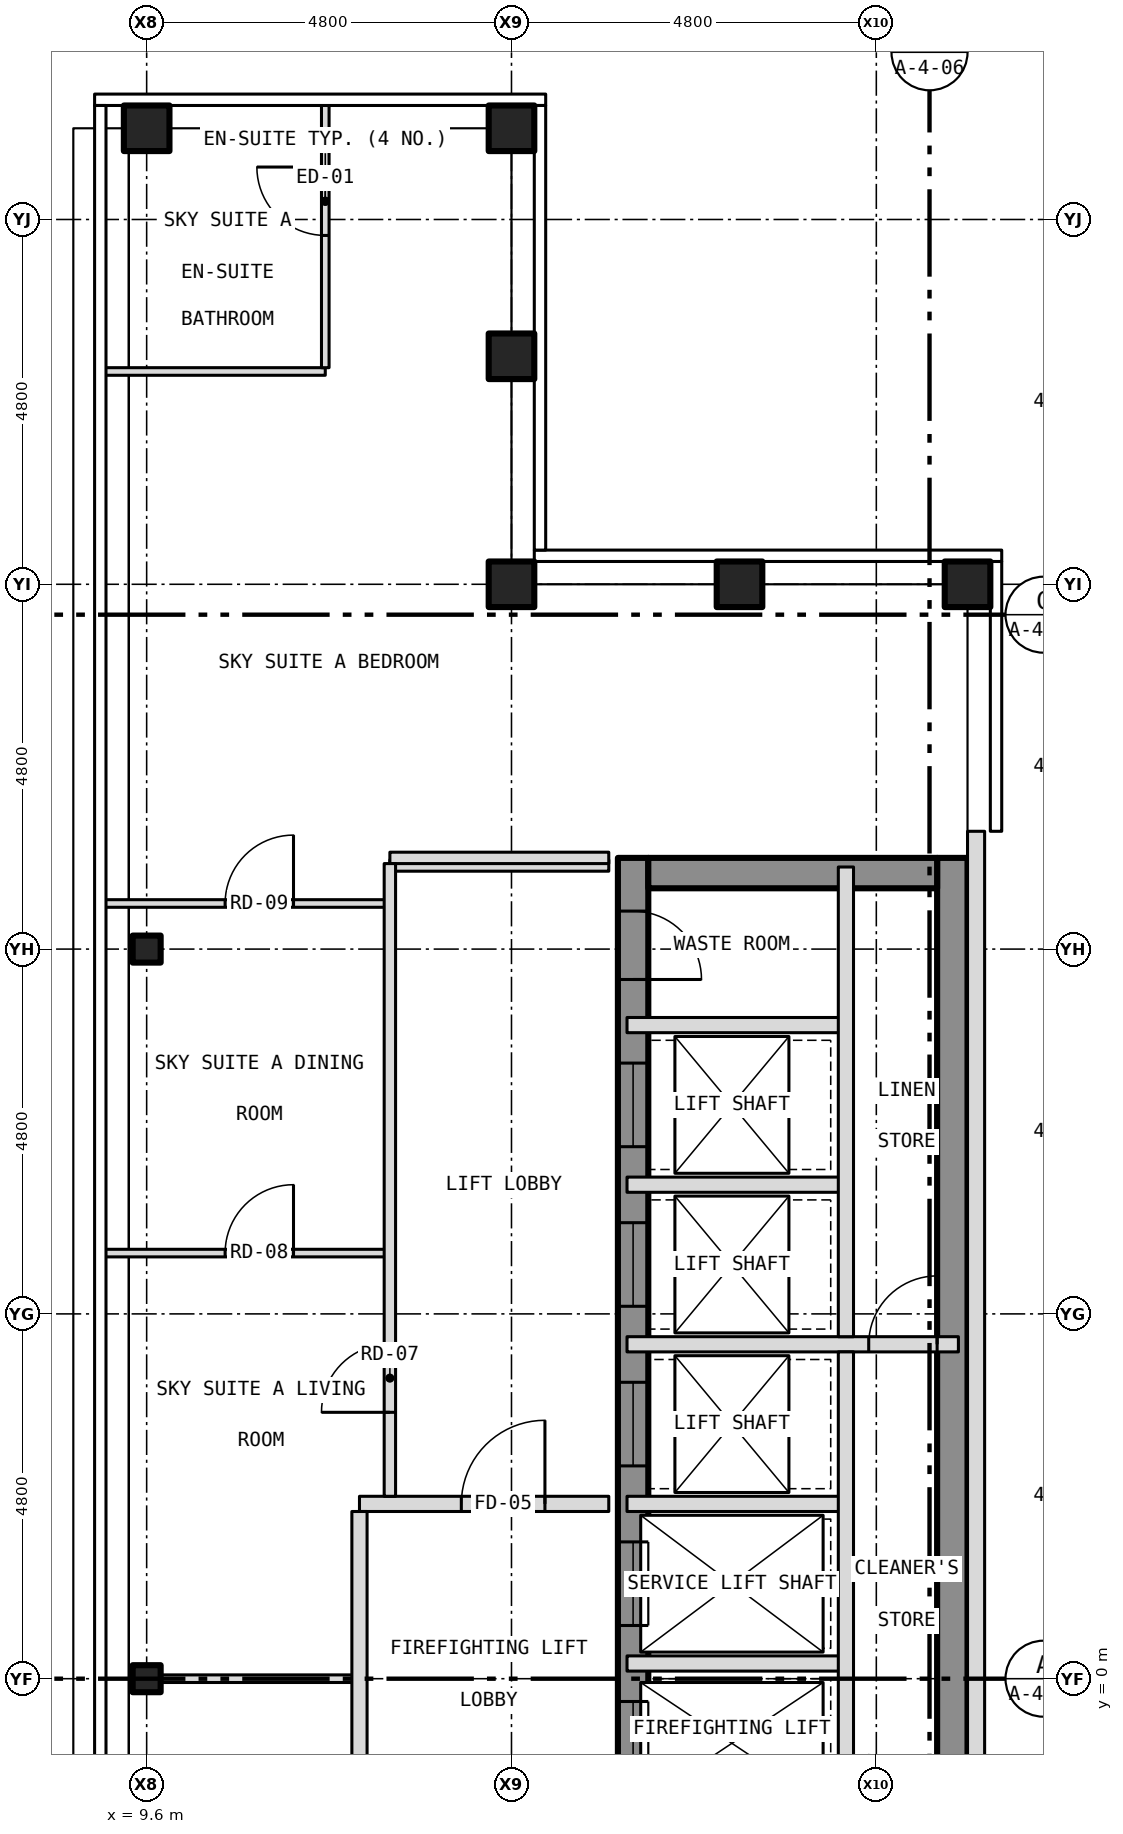
"""IFC4 building model, lengths in metres.
Left out: names, types, materials, properties, quantities, classifications, styles, units other than length and angle.
Written with IfcOpenShell. Run it as: python <this file> out.ifc"""

import sys

from ifc_helpers import new_model, si_unit, direction, frame, frame_2d, origin, origin_2d, place, context, subcontext, project, spatial, rectangle, hollow_rectangle, i_section, extrude, element, fill, save


model = new_model("IFC4")
c1 = context("Model", 3, precision=1e-05, world=origin(), true_north=direction((0.0, 1.0)))
c2 = subcontext(c1, "Body", "Model", "MODEL_VIEW")
j1 = project(units=[si_unit("LENGTHUNIT", "METRE"), si_unit("PLANEANGLEUNIT", "RADIAN")], contexts=[c1])
p1 = place(None, origin())
s1 = spatial("IfcSite", under=j1, at=p1, CompositionType="ELEMENT")
p2 = place(p1, origin())
s2 = spatial("IfcBuilding", under=s1, at=p2, CompositionType="ELEMENT")
p3 = place(p2, frame((0.0, 0.0, 276.0)))
s3 = spatial("IfcBuildingStorey", under=s2, at=p3, CompositionType="ELEMENT", Elevation=276.0)
for number, where, z_axis, x_axis in (
    (1, (9.6, 20.4, -0.15), (0.0, 0.0, 1.0), (1.0, 0.0, 0.0)),
    (2, (14.4, 20.4, -0.15), (0.0, 0.0, 1.0), (1.0, 0.0, 0.0)),
    (3, (20.4, 14.4, -0.15), (0.0, 0.0, 1.0), (1.0, 0.0, 0.0)),
    (4, (14.4, 14.4, -0.15), (0.0, 0.0, 1.0), (1.0, 0.0, 0.0)),
    (5, (14.4, 17.4, -0.15), (0.0, 0.0, 1.0), (1.0, 0.0, 0.0)),
    (6, (17.4, 14.4, -0.15), (0.0, 0.0, 1.0), (1.0, 0.0, 0.0)),
):
    element("IfcColumn", number, at=place(p3, frame(where, z_axis=z_axis, x_axis=x_axis)), inside=s3, PredefinedType="COLUMN", context=c2, shape_type="SweptSolid", body=[
        extrude(hollow_rectangle(XDim=0.6, YDim=0.6, WallThickness=0.03, at=origin_2d()), origin(), (0.0, 0.0, 1.0), 3.5),
    ])
for number, where, z_axis, x_axis in (
    (7, (9.6, 0.0, -0.15), (0.0, 0.0, 1.0), (1.0, 0.0, 0.0)),
    (8, (9.6, 9.6, -0.15), (0.0, 0.0, 1.0), (1.0, 0.0, 0.0)),
):
    element("IfcColumn", number, at=place(p3, frame(where, z_axis=z_axis, x_axis=x_axis)), inside=s3, PredefinedType="COLUMN", context=c2, shape_type="SweptSolid", body=[
        extrude(i_section(OverallWidth=0.368, OverallDepth=0.356, WebThickness=0.011, FlangeThickness=0.018, at=origin_2d()), origin(), (0.0, 0.0, 1.0), 3.5),
    ])
p4 = place(p3, frame((16.0, -10.8, 0.0), z_axis=(0.0, 0.0, 1.0), x_axis=(0.0, 1.0, 0.0)))
e9 = element("IfcWall", 9, at=p4, inside=s3, PredefinedType="SHEAR", context=c2, shape_type="SweptSolid", body=[
    extrude(rectangle(XDim=21.6, YDim=0.4, at=frame_2d((10.8, 0.0))), origin(), (0.0, 0.0, 1.0), 3.25),
])
p5 = place(p4, frame((9.4, 0.0, 0.0)))
e10 = element("IfcOpeningElement", 10, at=p5, cuts=e9, PredefinedType="OPENING", context=c2, shape_type="SweptSolid", body=[
    extrude(rectangle(XDim=1.1, YDim=2.1, at=frame_2d((0.55, 1.05))), frame((0.0, 0.212, 0.0), z_axis=(0.0, -1.0, 0.0), x_axis=(1.0, 0.0, 0.0)), (0.0, 0.0, 1.0), 0.424),
])
p6 = place(p4, frame((11.5, 0.0, 0.0)))
e11 = element("IfcOpeningElement", 11, at=p6, cuts=e9, PredefinedType="OPENING", context=c2, shape_type="SweptSolid", body=[
    extrude(rectangle(XDim=1.1, YDim=2.1, at=frame_2d((0.55, 1.05))), frame((0.0, 0.212, 0.0), z_axis=(0.0, -1.0, 0.0), x_axis=(1.0, 0.0, 0.0)), (0.0, 0.0, 1.0), 0.424),
])
p7 = place(p4, frame((13.6, 0.0, 0.0)))
e12 = element("IfcOpeningElement", 12, at=p7, cuts=e9, PredefinedType="OPENING", context=c2, shape_type="SweptSolid", body=[
    extrude(rectangle(XDim=1.1, YDim=2.1, at=frame_2d((0.55, 1.05))), frame((0.0, 0.212, 0.0), z_axis=(0.0, -1.0, 0.0), x_axis=(1.0, 0.0, 0.0)), (0.0, 0.0, 1.0), 0.424),
])
p8 = place(p4, frame((15.7, 0.0, 0.0)))
e13 = element("IfcOpeningElement", 13, at=p8, cuts=e9, PredefinedType="OPENING", context=c2, shape_type="SweptSolid", body=[
    extrude(rectangle(XDim=1.1, YDim=2.1, at=frame_2d((0.55, 1.05))), frame((0.0, 0.212, 0.0), z_axis=(0.0, -1.0, 0.0), x_axis=(1.0, 0.0, 0.0)), (0.0, 0.0, 1.0), 0.424),
])
p9 = place(p4, frame((17.8, 0.0, 0.0)))
e14 = element("IfcOpeningElement", 14, at=p9, cuts=e9, PredefinedType="OPENING", context=c2, shape_type="SweptSolid", body=[
    extrude(rectangle(XDim=1.1, YDim=2.1, at=frame_2d((0.55, 1.05))), frame((0.0, 0.212, 0.0), z_axis=(0.0, -1.0, 0.0), x_axis=(1.0, 0.0, 0.0)), (0.0, 0.0, 1.0), 0.424),
])
p10 = place(p4, frame((5.642, 0.0, 0.0)))
e15 = element("IfcOpeningElement", 15, at=p10, cuts=e9, PredefinedType="OPENING", context=c2, shape_type="SweptSolid", body=[
    extrude(rectangle(XDim=1.1, YDim=2.1, at=frame_2d((0.55, 1.05))), frame((0.0, 0.212, 0.0), z_axis=(0.0, -1.0, 0.0), x_axis=(1.0, 0.0, 0.0)), (0.0, 0.0, 1.0), 0.424),
])
p11 = place(p4, frame((7.5, 0.0, 0.0)))
e16 = element("IfcOpeningElement", 16, at=p11, cuts=e9, PredefinedType="OPENING", context=c2, shape_type="SweptSolid", body=[
    extrude(rectangle(XDim=1.1, YDim=2.1, at=frame_2d((0.55, 1.05))), frame((0.0, 0.212, 0.0), z_axis=(0.0, -1.0, 0.0), x_axis=(1.0, 0.0, 0.0)), (0.0, 0.0, 1.0), 0.424),
])
p12 = place(p4, frame((20.0, 0.0, 0.0)))
e17 = element("IfcOpeningElement", 17, at=p12, cuts=e9, PredefinedType="OPENING", context=c2, shape_type="SweptSolid", body=[
    extrude(rectangle(XDim=0.9, YDim=2.1, at=frame_2d((0.45, 1.05))), frame((0.0, 0.212, 0.0), z_axis=(0.0, -1.0, 0.0), x_axis=(1.0, 0.0, 0.0)), (0.0, 0.0, 1.0), 0.424),
])
p13 = place(p3, frame((20.2, -10.8, 0.0), z_axis=(0.0, 0.0, 1.0), x_axis=(0.0, 1.0, 0.0)))
e18 = element("IfcWall", 18, at=p13, inside=s3, PredefinedType="SHEAR", context=c2, shape_type="SweptSolid", body=[
    extrude(rectangle(XDim=21.6, YDim=0.4, at=frame_2d((10.8, 0.0))), origin(), (0.0, 0.0, 1.0), 3.25),
])
p14 = place(p3, frame((16.2, 10.6, 0.0), z_axis=(0.0, 0.0, 1.0), x_axis=(1.0, 0.0, 0.0)))
e19 = element("IfcWall", 19, at=p14, inside=s3, PredefinedType="SHEAR", context=c2, shape_type="SweptSolid", body=[
    extrude(rectangle(XDim=3.8, YDim=0.4, at=frame_2d((1.9, 0.0))), origin(), (0.0, 0.0, 1.0), 3.25),
])
p15 = place(p3, frame((20.512, -11.15, 0.0), z_axis=(0.0, 0.0, 1.0), x_axis=(0.0, 1.0, 0.0)))
e20 = element("IfcWall", 20, at=p15, inside=s3, PredefinedType="SOLIDWALL", context=c2, shape_type="SweptSolid", body=[
    extrude(rectangle(XDim=22.3, YDim=0.225, at=frame_2d((11.15, 0.0))), origin(), (0.0, 0.0, 1.0), 3.5),
])
p16 = place(p15, frame((3.3, 0.0, 1.0)))
e21 = element("IfcOpeningElement", 21, at=p16, cuts=e20, PredefinedType="OPENING", context=c2, shape_type="SweptSolid", body=[
    extrude(rectangle(XDim=0.6, YDim=1.5, at=frame_2d((0.3, 0.75))), frame((0.0, 0.125, 0.0), z_axis=(0.0, -1.0, 0.0), x_axis=(1.0, 0.0, 0.0)), (0.0, 0.0, 1.0), 0.249),
])
p17 = place(p3, frame((9.485, 0.0, 0.0), z_axis=(0.0, 0.0, 1.0), x_axis=(1.0, 0.0, 0.0)))
e22 = element("IfcWall", 22, at=p17, inside=s3, PredefinedType="PARTITIONING", context=c2, shape_type="SweptSolid", body=[
    extrude(rectangle(XDim=2.915, YDim=0.1, at=frame_2d((1.458, 0.0))), origin(), (0.0, 0.0, 1.0), 2.728),
])
p18 = place(p3, frame((15.92, 0.2, 0.0), z_axis=(0.0, 0.0, 1.0), x_axis=(1.0, 0.0, 0.0)))
e23 = element("IfcWall", 23, at=p18, inside=s3, PredefinedType="PARTITIONING", context=c2, shape_type="SweptSolid", body=[
    extrude(rectangle(XDim=2.88, YDim=0.2, at=frame_2d((1.44, 0.0))), origin(), (0.0, 0.0, 1.0), 3.25),
])
p19 = place(p3, frame((12.4, 2.3, 0.0), z_axis=(0.0, 0.0, 1.0), x_axis=(1.0, 0.0, 0.0)))
e24 = element("IfcWall", 24, at=p19, inside=s3, PredefinedType="PARTITIONING", context=c2, shape_type="SweptSolid", body=[
    extrude(rectangle(XDim=3.28, YDim=0.2, at=frame_2d((1.64, 0.0))), origin(), (0.0, 0.0, 1.0), 3.35),
])
p20 = place(p19, frame((1.34, 0.0, 0.0)))
e25 = element("IfcOpeningElement", 25, at=p20, cuts=e24, PredefinedType="OPENING", context=c2, shape_type="SweptSolid", body=[
    extrude(rectangle(XDim=1.1, YDim=2.1, at=frame_2d((0.55, 1.05))), frame((0.0, 0.112, 0.0), z_axis=(0.0, -1.0, 0.0), x_axis=(1.0, 0.0, 0.0)), (0.0, 0.0, 1.0), 0.224),
])
p21 = place(p3, frame((15.92, 2.3, 0.0), z_axis=(0.0, 0.0, 1.0), x_axis=(1.0, 0.0, 0.0)))
e26 = element("IfcWall", 26, at=p21, inside=s3, PredefinedType="PARTITIONING", context=c2, shape_type="SweptSolid", body=[
    extrude(rectangle(XDim=2.88, YDim=0.2, at=frame_2d((1.44, 0.0))), origin(), (0.0, 0.0, 1.0), 3.25),
])
p22 = place(p3, frame((15.92, 4.4, 0.0), z_axis=(0.0, 0.0, 1.0), x_axis=(1.0, 0.0, 0.0)))
e27 = element("IfcWall", 27, at=p22, inside=s3, PredefinedType="PARTITIONING", context=c2, shape_type="SweptSolid", body=[
    extrude(rectangle(XDim=4.36, YDim=0.2, at=frame_2d((2.18, 0.0))), origin(), (0.0, 0.0, 1.0), 3.25),
])
p23 = place(p22, frame((3.18, 0.0, 0.0)))
e28 = element("IfcOpeningElement", 28, at=p23, cuts=e27, PredefinedType="OPENING", context=c2, shape_type="SweptSolid", body=[
    extrude(rectangle(XDim=0.9, YDim=2.1, at=frame_2d((0.45, 1.05))), frame((0.0, 0.112, 0.0), z_axis=(0.0, -1.0, 0.0), x_axis=(1.0, 0.0, 0.0)), (0.0, 0.0, 1.0), 0.224),
])
p24 = place(p3, frame((9.035, 5.6, 0.0), z_axis=(0.0, 0.0, 1.0), x_axis=(1.0, 0.0, 0.0)))
e29 = element("IfcWall", 29, at=p24, inside=s3, PredefinedType="PARTITIONING", context=c2, shape_type="SweptSolid", body=[
    extrude(rectangle(XDim=3.765, YDim=0.1, at=frame_2d((1.883, 0.0))), origin(), (0.0, 0.0, 1.0), 3.35),
])
p25 = place(p24, frame((1.597, 0.0, 0.0)))
e30 = element("IfcOpeningElement", 30, at=p25, cuts=e29, PredefinedType="OPENING", context=c2, shape_type="SweptSolid", body=[
    extrude(rectangle(XDim=0.9, YDim=2.1, at=frame_2d((0.45, 1.05))), frame((0.0, 0.062, 0.0), z_axis=(0.0, -1.0, 0.0), x_axis=(1.0, 0.0, 0.0)), (0.0, 0.0, 1.0), 0.124),
])
for number, where, z_axis, x_axis in (
    (31, (15.92, 6.5, 0.0), (0.0, 0.0, 1.0), (1.0, 0.0, 0.0)),
    (32, (15.92, 8.6, 0.0), (0.0, 0.0, 1.0), (1.0, 0.0, 0.0)),
):
    element("IfcWall", number, at=place(p3, frame(where, z_axis=z_axis, x_axis=x_axis)), inside=s3, PredefinedType="PARTITIONING", context=c2, shape_type="SweptSolid", body=[
        extrude(rectangle(XDim=2.88, YDim=0.2, at=frame_2d((1.44, 0.0))), origin(), (0.0, 0.0, 1.0), 3.25),
    ])
p26 = place(p3, frame((9.035, 10.2, 0.0), z_axis=(0.0, 0.0, 1.0), x_axis=(1.0, 0.0, 0.0)))
e33 = element("IfcWall", 33, at=p26, inside=s3, PredefinedType="PARTITIONING", context=c2, shape_type="SweptSolid", body=[
    extrude(rectangle(XDim=3.765, YDim=0.1, at=frame_2d((1.883, 0.0))), origin(), (0.0, 0.0, 1.0), 3.35),
])
p27 = place(p26, frame((1.597, 0.0, 0.0)))
e34 = element("IfcOpeningElement", 34, at=p27, cuts=e33, PredefinedType="OPENING", context=c2, shape_type="SweptSolid", body=[
    extrude(rectangle(XDim=0.9, YDim=2.1, at=frame_2d((0.45, 1.05))), frame((0.0, 0.062, 0.0), z_axis=(0.0, -1.0, 0.0), x_axis=(1.0, 0.0, 0.0)), (0.0, 0.0, 1.0), 0.124),
])
for number, where, z_axis, x_axis in (
    (35, (12.8, 10.7, 0.0), (0.0, 0.0, 1.0), (1.0, 0.0, 0.0)),
    (36, (12.8, 10.8, 0.0), (0.0, 0.0, 1.0), (1.0, 0.0, 0.0)),
):
    element("IfcWall", number, at=place(p3, frame(where, z_axis=z_axis, x_axis=x_axis)), inside=s3, PredefinedType="PARTITIONING", context=c2, shape_type="SweptSolid", body=[
        extrude(rectangle(XDim=2.88, YDim=0.15, at=frame_2d((1.44, 0.0))), origin(), (0.0, 0.0, 1.0), 3.35),
    ])
p28 = place(p3, frame((9.035, 17.2, 0.0), z_axis=(0.0, 0.0, 1.0), x_axis=(1.0, 0.0, 0.0)))
e37 = element("IfcWall", 37, at=p28, inside=s3, PredefinedType="PARTITIONING", context=c2, shape_type="SweptSolid", body=[
    extrude(rectangle(XDim=2.915, YDim=0.1, at=frame_2d((1.458, 0.0))), origin(), (0.0, 0.0, 1.0), 3.35),
])
p29 = place(p3, frame((11.95, 17.25, 0.0), z_axis=(0.0, 0.0, 1.0), x_axis=(0.0, 1.0, 0.0)))
e38 = element("IfcWall", 38, at=p29, inside=s3, PredefinedType="PARTITIONING", context=c2, shape_type="SweptSolid", body=[
    extrude(rectangle(XDim=3.48, YDim=0.1, at=frame_2d((1.74, 0.0))), origin(), (0.0, 0.0, 1.0), 3.35),
])
p30 = place(p29, frame((1.74, 0.0, 0.0)))
e39 = element("IfcOpeningElement", 39, at=p30, cuts=e38, PredefinedType="OPENING", context=c2, shape_type="SweptSolid", body=[
    extrude(rectangle(XDim=0.9, YDim=2.1, at=frame_2d((0.45, 1.05))), frame((0.0, 0.062, 0.0), z_axis=(0.0, -1.0, 0.0), x_axis=(1.0, 0.0, 0.0)), (0.0, 0.0, 1.0), 0.124),
])
p31 = place(p3, frame((12.4, -1.8, 0.0), z_axis=(0.0, 0.0, 1.0), x_axis=(0.0, 1.0, 0.0)))
e40 = element("IfcWall", 40, at=p31, inside=s3, PredefinedType="PARTITIONING", context=c2, shape_type="SweptSolid", body=[
    extrude(rectangle(XDim=4.0, YDim=0.2, at=frame_2d((2.0, 0.0))), origin(), (0.0, 0.0, 1.0), 3.35),
])
p32 = place(p3, frame((12.8, 2.4, 0.0), z_axis=(0.0, 0.0, 1.0), x_axis=(0.0, 1.0, 0.0)))
e41 = element("IfcWall", 41, at=p32, inside=s3, PredefinedType="PARTITIONING", context=c2, shape_type="SweptSolid", body=[
    extrude(rectangle(XDim=8.325, YDim=0.15, at=frame_2d((4.163, 0.0))), origin(), (0.0, 0.0, 1.0), 3.35),
])
p33 = place(p32, frame((1.105, 0.0, 0.0)))
e42 = element("IfcOpeningElement", 42, at=p33, cuts=e41, PredefinedType="OPENING", context=c2, shape_type="SweptSolid", body=[
    extrude(rectangle(XDim=0.9, YDim=2.1, at=frame_2d((0.45, 1.05))), frame((0.0, 0.087, 0.0), z_axis=(0.0, -1.0, 0.0), x_axis=(1.0, 0.0, 0.0)), (0.0, 0.0, 1.0), 0.174),
])
p34 = place(p3, frame((18.8, -1.8, 0.0), z_axis=(0.0, 0.0, 1.0), x_axis=(0.0, 1.0, 0.0)))
e43 = element("IfcWall", 43, at=p34, inside=s3, PredefinedType="PARTITIONING", context=c2, shape_type="SweptSolid", body=[
    extrude(rectangle(XDim=6.1, YDim=0.2, at=frame_2d((3.05, 0.0))), origin(), (0.0, 0.0, 1.0), 3.25),
])
p35 = place(p3, frame((18.8, 4.5, 0.0), z_axis=(0.0, 0.0, 1.0), x_axis=(0.0, 1.0, 0.0)))
e44 = element("IfcWall", 44, at=p35, inside=s3, PredefinedType="PARTITIONING", context=c2, shape_type="SweptSolid", body=[
    extrude(rectangle(XDim=6.18, YDim=0.2, at=frame_2d((3.09, 0.0))), origin(), (0.0, 0.0, 1.0), 3.25),
])
p36 = place(p5, origin())
e45 = element("IfcDoor", 45, at=p36, inside=s3, OperationType="SLIDING_TO_LEFT", PredefinedType="DOOR", context=c2, shape_type="SweptSolid", body=[
    extrude(rectangle(XDim=1.1, YDim=2.1, at=frame_2d((0.55, 1.05))), frame((0.0, 0.025, 0.0), z_axis=(0.0, -1.0, 0.0), x_axis=(1.0, 0.0, 0.0)), (0.0, 0.0, 1.0), 0.05),
])
fill(e10, e45)
p37 = place(p6, origin())
e46 = element("IfcDoor", 46, at=p37, inside=s3, OperationType="SLIDING_TO_LEFT", PredefinedType="DOOR", context=c2, shape_type="SweptSolid", body=[
    extrude(rectangle(XDim=1.1, YDim=2.1, at=frame_2d((0.55, 1.05))), frame((0.0, 0.025, 0.0), z_axis=(0.0, -1.0, 0.0), x_axis=(1.0, 0.0, 0.0)), (0.0, 0.0, 1.0), 0.05),
])
fill(e11, e46)
p38 = place(p7, origin())
e47 = element("IfcDoor", 47, at=p38, inside=s3, OperationType="SLIDING_TO_LEFT", PredefinedType="DOOR", context=c2, shape_type="SweptSolid", body=[
    extrude(rectangle(XDim=1.1, YDim=2.1, at=frame_2d((0.55, 1.05))), frame((0.0, 0.025, 0.0), z_axis=(0.0, -1.0, 0.0), x_axis=(1.0, 0.0, 0.0)), (0.0, 0.0, 1.0), 0.05),
])
fill(e12, e47)
p39 = place(p8, origin())
e48 = element("IfcDoor", 48, at=p39, inside=s3, OperationType="SLIDING_TO_LEFT", PredefinedType="DOOR", context=c2, shape_type="SweptSolid", body=[
    extrude(rectangle(XDim=1.1, YDim=2.1, at=frame_2d((0.55, 1.05))), frame((0.0, 0.025, 0.0), z_axis=(0.0, -1.0, 0.0), x_axis=(1.0, 0.0, 0.0)), (0.0, 0.0, 1.0), 0.05),
])
fill(e13, e48)
p40 = place(p9, origin())
e49 = element("IfcDoor", 49, at=p40, inside=s3, OperationType="SLIDING_TO_LEFT", PredefinedType="DOOR", context=c2, shape_type="SweptSolid", body=[
    extrude(rectangle(XDim=1.1, YDim=2.1, at=frame_2d((0.55, 1.05))), frame((0.0, 0.025, 0.0), z_axis=(0.0, -1.0, 0.0), x_axis=(1.0, 0.0, 0.0)), (0.0, 0.0, 1.0), 0.05),
])
fill(e14, e49)
p41 = place(p12, origin())
e50 = element("IfcDoor", 50, at=p41, inside=s3, OperationType="SINGLE_SWING_LEFT", PredefinedType="DOOR", context=c2, shape_type="SweptSolid", body=[
    extrude(rectangle(XDim=0.9, YDim=2.1, at=frame_2d((0.45, 1.05))), frame((0.0, 0.025, 0.0), z_axis=(0.0, -1.0, 0.0), x_axis=(1.0, 0.0, 0.0)), (0.0, 0.0, 1.0), 0.05),
])
fill(e17, e50)
p42 = place(p23, origin())
e51 = element("IfcDoor", 51, at=p42, inside=s3, OperationType="SINGLE_SWING_RIGHT", PredefinedType="DOOR", context=c2, shape_type="SweptSolid", body=[
    extrude(rectangle(XDim=0.9, YDim=2.1, at=frame_2d((0.45, 1.05))), frame((0.0, 0.025, 0.0), z_axis=(0.0, -1.0, 0.0), x_axis=(1.0, 0.0, 0.0)), (0.0, 0.0, 1.0), 0.05),
])
fill(e28, e51)
p43 = place(p20, origin())
e52 = element("IfcDoor", 52, at=p43, inside=s3, OperationType="SINGLE_SWING_RIGHT", PredefinedType="DOOR", context=c2, shape_type="SweptSolid", body=[
    extrude(rectangle(XDim=1.1, YDim=2.1, at=frame_2d((0.55, 1.05))), frame((0.0, 0.025, 0.0), z_axis=(0.0, -1.0, 0.0), x_axis=(1.0, 0.0, 0.0)), (0.0, 0.0, 1.0), 0.05),
])
fill(e25, e52)
p44 = place(p33, origin())
e53 = element("IfcDoor", 53, at=p44, inside=s3, OperationType="SINGLE_SWING_LEFT", PredefinedType="DOOR", context=c2, shape_type="SweptSolid", body=[
    extrude(rectangle(XDim=0.9, YDim=2.1, at=frame_2d((0.45, 1.05))), frame((0.0, 0.025, 0.0), z_axis=(0.0, -1.0, 0.0), x_axis=(1.0, 0.0, 0.0)), (0.0, 0.0, 1.0), 0.05),
])
fill(e42, e53)
p45 = place(p25, origin())
e54 = element("IfcDoor", 54, at=p45, inside=s3, OperationType="SINGLE_SWING_RIGHT", PredefinedType="DOOR", context=c2, shape_type="SweptSolid", body=[
    extrude(rectangle(XDim=0.9, YDim=2.1, at=frame_2d((0.45, 1.05))), frame((0.0, 0.025, 0.0), z_axis=(0.0, -1.0, 0.0), x_axis=(1.0, 0.0, 0.0)), (0.0, 0.0, 1.0), 0.05),
])
fill(e30, e54)
p46 = place(p27, origin())
e55 = element("IfcDoor", 55, at=p46, inside=s3, OperationType="SINGLE_SWING_RIGHT", PredefinedType="DOOR", context=c2, shape_type="SweptSolid", body=[
    extrude(rectangle(XDim=0.9, YDim=2.1, at=frame_2d((0.45, 1.05))), frame((0.0, 0.025, 0.0), z_axis=(0.0, -1.0, 0.0), x_axis=(1.0, 0.0, 0.0)), (0.0, 0.0, 1.0), 0.05),
])
fill(e34, e55)
p47 = place(p30, origin())
e56 = element("IfcDoor", 56, at=p47, inside=s3, OperationType="SINGLE_SWING_RIGHT", PredefinedType="DOOR", context=c2, shape_type="SweptSolid", body=[
    extrude(rectangle(XDim=0.9, YDim=2.1, at=frame_2d((0.45, 1.05))), frame((0.0, 0.025, 0.0), z_axis=(0.0, -1.0, 0.0), x_axis=(1.0, 0.0, 0.0)), (0.0, 0.0, 1.0), 0.05),
])
fill(e39, e56)
save(model, sys.argv[1])
